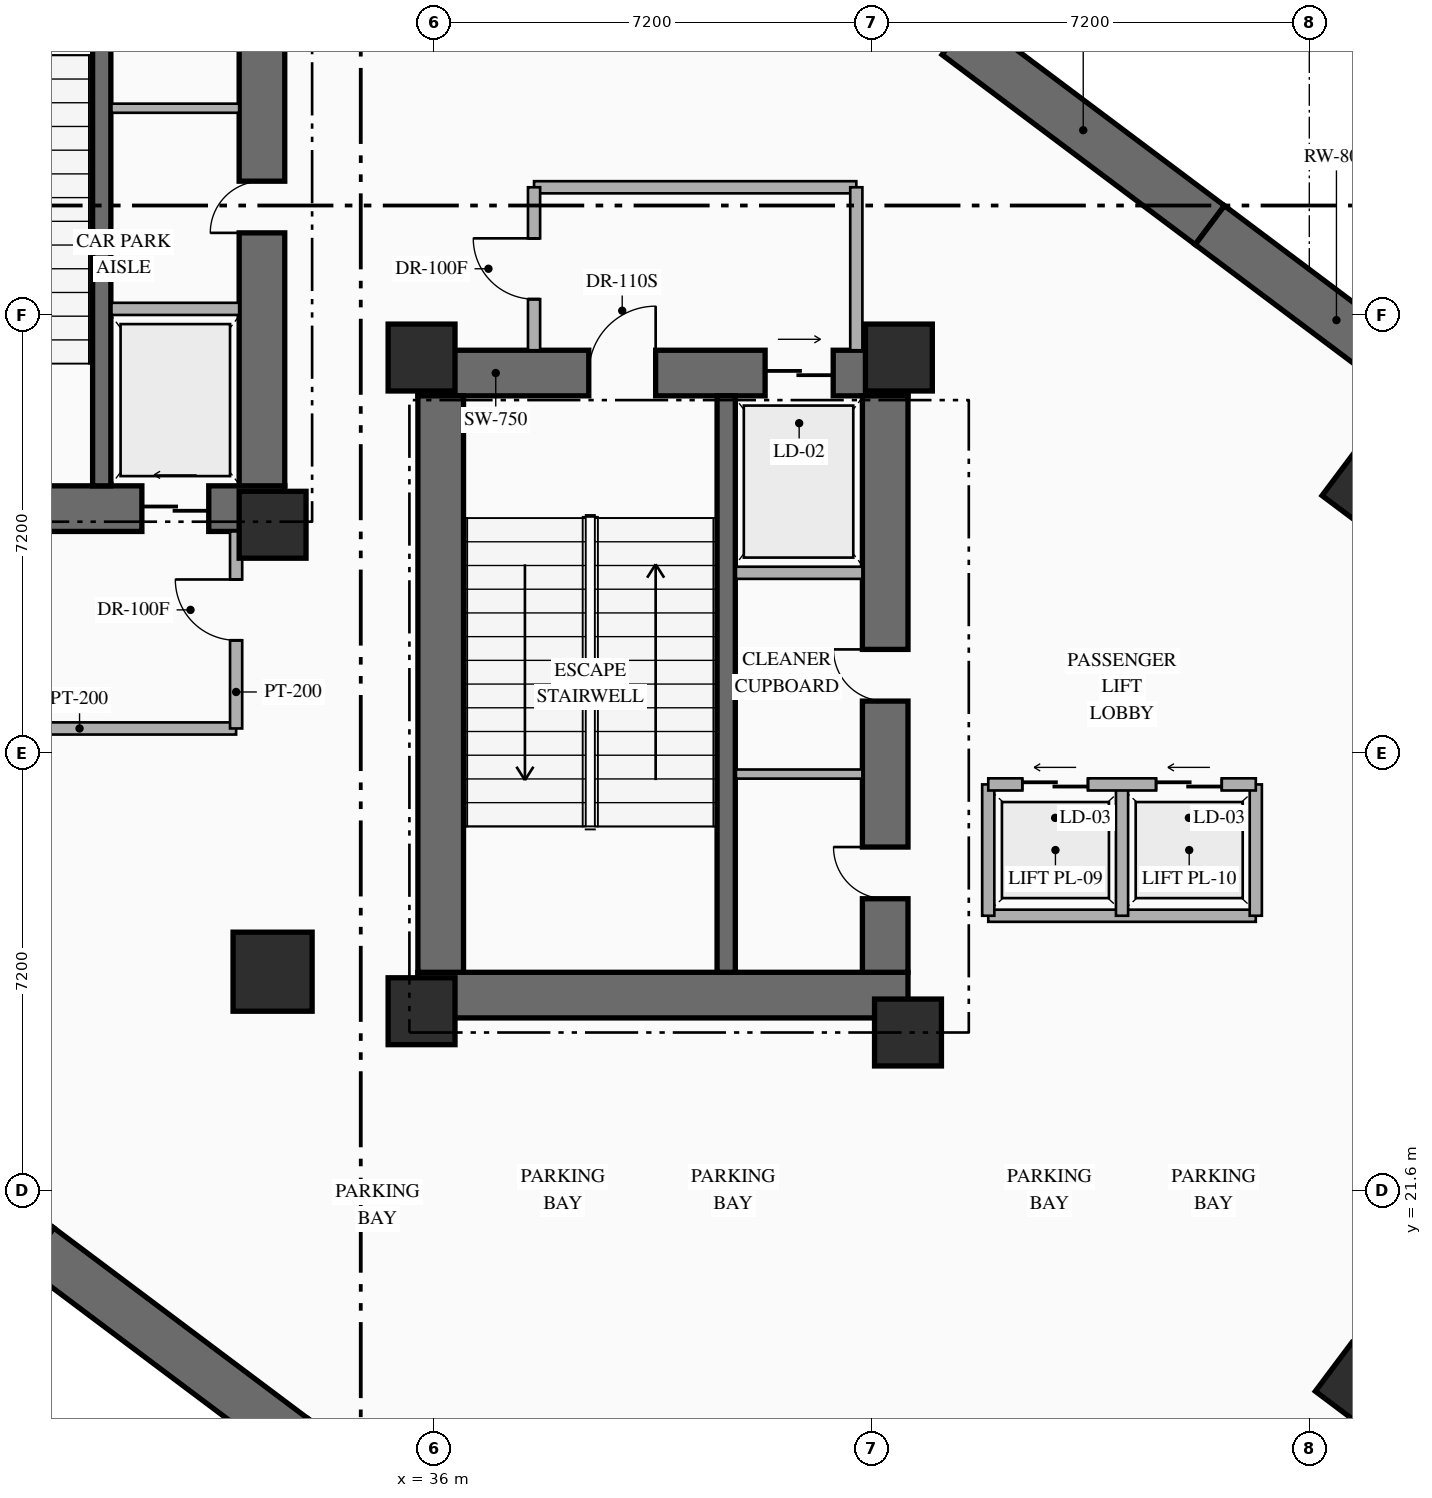
"""IFC4 building model, lengths in metres.
Left out: names, types, materials, properties, quantities, classifications, styles, units other than length and angle.
Written with IfcOpenShell. Run it as: python <this file> out.ifc"""

import sys

from ifc_helpers import new_model, si_unit, direction, frame, frame_2d, origin, origin_2d, place, context, subcontext, project, spatial, rectangle, hollow_rectangle, extrude, element, fill, save


model = new_model("IFC4")
c1 = context("Model", 3, precision=1e-05, world=origin(), true_north=direction((0.0, 1.0)))
c2 = subcontext(c1, "Body", "Model", "MODEL_VIEW")
j1 = project(units=[si_unit("LENGTHUNIT", "METRE"), si_unit("PLANEANGLEUNIT", "RADIAN")], contexts=[c1])
p1 = place(None, origin())
s1 = spatial("IfcSite", under=j1, at=p1, CompositionType="ELEMENT")
p2 = place(p1, origin())
s2 = spatial("IfcBuilding", under=s1, at=p2, CompositionType="ELEMENT")
p3 = place(p2, frame((0.0, 0.0, -9.6)))
s3 = spatial("IfcBuildingStorey", under=s2, at=p3, CompositionType="ELEMENT", Elevation=-9.6)
p4 = place(p3, frame((25.47, 32.815, 0.0), z_axis=(0.0, 0.0, 1.0), x_axis=(1.0, 0.0, 0.0)))
e1 = element("IfcWall", 1, at=p4, inside=s3, PredefinedType="SHEAR", context=c2, shape_type="SweptSolid", body=[
    extrude(rectangle(XDim=8.08, YDim=0.75, at=frame_2d((4.04, 0.0))), origin(), (0.0, 0.0, 1.0), 4.8),
])
p5 = place(p4, frame((2.98, 0.0, 0.0)))
e2 = element("IfcOpeningElement", 2, at=p5, cuts=e1, PredefinedType="OPENING", context=c2, shape_type="SweptSolid", body=[
    extrude(rectangle(XDim=1.1, YDim=2.2, at=frame_2d((0.55, 1.1))), frame((0.0, 0.385, 0.0), z_axis=(0.0, -1.0, 0.0), x_axis=(1.0, 0.0, 0.0)), (0.0, 0.0, 1.0), 0.77),
])
p6 = place(p4, frame((5.73, 0.0, 0.0)))
e3 = element("IfcOpeningElement", 3, at=p6, cuts=e1, PredefinedType="OPENING", context=c2, shape_type="SweptSolid", body=[
    extrude(rectangle(XDim=1.1, YDim=2.15, at=frame_2d((0.55, 1.075))), frame((0.0, 0.385, 0.0), z_axis=(0.0, -1.0, 0.0), x_axis=(1.0, 0.0, 0.0)), (0.0, 0.0, 1.0), 0.77),
])
p7 = place(p3, frame((33.175, 33.19, 0.0), z_axis=(0.0, 0.0, 1.0), x_axis=(0.0, 1.0, 0.0)))
e4 = element("IfcWall", 4, at=p7, inside=s3, PredefinedType="SHEAR", context=c2, shape_type="SweptSolid", body=[
    extrude(rectangle(XDim=9.48, YDim=0.75, at=frame_2d((4.74, 0.0))), origin(), (0.0, 0.0, 1.0), 4.8),
])
p8 = place(p7, frame((4.16, 0.0, 0.0)))
e5 = element("IfcOpeningElement", 5, at=p8, cuts=e4, PredefinedType="OPENING", context=c2, shape_type="SweptSolid", body=[
    extrude(rectangle(XDim=0.85, YDim=2.08, at=frame_2d((0.425, 1.04))), frame((0.0, 0.385, 0.0), z_axis=(0.0, -1.0, 0.0), x_axis=(1.0, 0.0, 0.0)), (0.0, 0.0, 1.0), 0.77),
])
p9 = place(p7, frame((7.36, 0.0, 0.0)))
e6 = element("IfcOpeningElement", 6, at=p9, cuts=e4, PredefinedType="OPENING", context=c2, shape_type="SweptSolid", body=[
    extrude(rectangle(XDim=0.85, YDim=2.08, at=frame_2d((0.425, 1.04))), frame((0.0, 0.385, 0.0), z_axis=(0.0, -1.0, 0.0), x_axis=(1.0, 0.0, 0.0)), (0.0, 0.0, 1.0), 0.77),
])
p10 = place(p3, frame((30.54, 33.19, 0.0), z_axis=(0.0, 0.0, 1.0), x_axis=(0.0, 1.0, 0.0)))
e7 = element("IfcWall", 7, at=p10, inside=s3, PredefinedType="SHEAR", context=c2, shape_type="SweptSolid", body=[
    extrude(rectangle(XDim=9.48, YDim=0.3, at=frame_2d((4.74, 0.0))), origin(), (0.0, 0.0, 1.0), 4.8),
])
p11 = place(p3, frame((35.74, 24.815, 0.0), z_axis=(0.0, 0.0, 1.0), x_axis=(1.0, 0.0, 0.0)))
e8 = element("IfcWall", 8, at=p11, inside=s3, PredefinedType="SHEAR", context=c2, shape_type="SweptSolid", body=[
    extrude(rectangle(XDim=8.06, YDim=0.75, at=frame_2d((4.03, 0.0))), origin(), (0.0, 0.0, 1.0), 4.8),
])
p12 = place(p3, frame((35.74, 35.045, 0.0), z_axis=(0.0, 0.0, 1.0), x_axis=(1.0, 0.0, 0.0)))
e9 = element("IfcWall", 9, at=p12, inside=s3, PredefinedType="SHEAR", context=c2, shape_type="SweptSolid", body=[
    extrude(rectangle(XDim=8.06, YDim=0.75, at=frame_2d((4.03, 0.0))), origin(), (0.0, 0.0, 1.0), 4.8),
])
p13 = place(p12, frame((2.81, 0.0, 0.0)))
e10 = element("IfcOpeningElement", 10, at=p13, cuts=e9, PredefinedType="OPENING", context=c2, shape_type="SweptSolid", body=[
    extrude(rectangle(XDim=1.1, YDim=2.2, at=frame_2d((0.55, 1.1))), frame((0.0, 0.385, 0.0), z_axis=(0.0, -1.0, 0.0), x_axis=(1.0, 0.0, 0.0)), (0.0, 0.0, 1.0), 0.77),
])
p14 = place(p12, frame((5.71, 0.0, 0.0)))
e11 = element("IfcOpeningElement", 11, at=p14, cuts=e9, PredefinedType="OPENING", context=c2, shape_type="SweptSolid", body=[
    extrude(rectangle(XDim=1.12, YDim=2.15, at=frame_2d((0.56, 1.075))), frame((0.0, 0.385, 0.0), z_axis=(0.0, -1.0, 0.0), x_axis=(1.0, 0.0, 0.0)), (0.0, 0.0, 1.0), 0.77),
])
p15 = place(p3, frame((36.115, 25.19, 0.0), z_axis=(0.0, 0.0, 1.0), x_axis=(0.0, 1.0, 0.0)))
e12 = element("IfcWall", 12, at=p15, inside=s3, PredefinedType="SHEAR", context=c2, shape_type="SweptSolid", body=[
    extrude(rectangle(XDim=9.48, YDim=0.75, at=frame_2d((4.74, 0.0))), origin(), (0.0, 0.0, 1.0), 4.8),
])
p16 = place(p3, frame((43.425, 25.19, 0.0), z_axis=(0.0, 0.0, 1.0), x_axis=(0.0, 1.0, 0.0)))
e13 = element("IfcWall", 13, at=p16, inside=s3, PredefinedType="SHEAR", context=c2, shape_type="SweptSolid", body=[
    extrude(rectangle(XDim=9.48, YDim=0.75, at=frame_2d((4.74, 0.0))), origin(), (0.0, 0.0, 1.0), 4.8),
])
p17 = place(p16, frame((1.21, 0.0, 0.0)))
e14 = element("IfcOpeningElement", 14, at=p17, cuts=e13, PredefinedType="OPENING", context=c2, shape_type="SweptSolid", body=[
    extrude(rectangle(XDim=0.85, YDim=2.08, at=frame_2d((0.425, 1.04))), frame((0.0, 0.385, 0.0), z_axis=(0.0, -1.0, 0.0), x_axis=(1.0, 0.0, 0.0)), (0.0, 0.0, 1.0), 0.77),
])
p18 = place(p16, frame((4.46, 0.0, 0.0)))
e15 = element("IfcOpeningElement", 15, at=p18, cuts=e13, PredefinedType="OPENING", context=c2, shape_type="SweptSolid", body=[
    extrude(rectangle(XDim=0.85, YDim=2.08, at=frame_2d((0.425, 1.04))), frame((0.0, 0.385, 0.0), z_axis=(0.0, -1.0, 0.0), x_axis=(1.0, 0.0, 0.0)), (0.0, 0.0, 1.0), 0.77),
])
p19 = place(p3, frame((40.81, 25.19, 0.0), z_axis=(0.0, 0.0, 1.0), x_axis=(0.0, 1.0, 0.0)))
e16 = element("IfcWall", 16, at=p19, inside=s3, PredefinedType="SHEAR", context=c2, shape_type="SweptSolid", body=[
    extrude(rectangle(XDim=9.48, YDim=0.3, at=frame_2d((4.74, 0.0))), origin(), (0.0, 0.0, 1.0), 4.8),
])
p20 = place(p3, frame((44.6, 40.6, 0.0), z_axis=(0.0, 0.0, 1.0), x_axis=(0.799983113496, -0.600022514679, 0.0)))
e17 = element("IfcWall", 17, at=p20, inside=s3, PredefinedType="SHEAR", context=c2, shape_type="SweptSolid", body=[
    extrude(rectangle(XDim=5.205, YDim=0.8, at=frame_2d((2.603, 0.0))), origin(), (0.0, 0.0, 1.0), 4.5),
])
p21 = place(p3, frame((48.764, 37.477, 0.0), z_axis=(0.0, 0.0, 1.0), x_axis=(0.799977491278, -0.600030010457, 0.0)))
e18 = element("IfcWall", 18, at=p21, inside=s3, PredefinedType="SHEAR", context=c2, shape_type="SweptSolid", body=[
    extrude(rectangle(XDim=5.207, YDim=0.8, at=frame_2d((2.603, 0.0))), origin(), (0.0, 0.0, 1.0), 4.5),
])
p22 = place(p3, frame((37.87, 14.397, 0.0), z_axis=(0.0, 0.0, 1.0), x_axis=(-0.800033648948, 0.599955132115, 0.0)))
e19 = element("IfcWall", 19, at=p22, inside=s3, PredefinedType="SHEAR", context=c2, shape_type="SweptSolid", body=[
    extrude(rectangle(XDim=5.224, YDim=0.8, at=frame_2d((2.612, 0.0))), origin(), (0.0, 0.0, 1.0), 4.5),
])
p23 = place(p3, frame((33.691, 17.531, 0.0), z_axis=(0.0, 0.0, 1.0), x_axis=(-0.799927090767, 0.600097200008, 0.0)))
e20 = element("IfcWall", 20, at=p23, inside=s3, PredefinedType="SHEAR", context=c2, shape_type="SweptSolid", body=[
    extrude(rectangle(XDim=5.224, YDim=0.8, at=frame_2d((2.612, 0.0))), origin(), (0.0, 0.0, 1.0), 4.5),
])
p24 = place(p3, frame((29.512, 20.666, 0.0), z_axis=(0.0, 0.0, 1.0), x_axis=(-0.800016825418, 0.599977565455, 0.0)))
e21 = element("IfcWall", 21, at=p24, inside=s3, PredefinedType="SHEAR", context=c2, shape_type="SweptSolid", body=[
    extrude(rectangle(XDim=5.224, YDim=0.8, at=frame_2d((2.612, 0.0))), origin(), (0.0, 0.0, 1.0), 4.5),
])
for number, where, z_axis, x_axis in (
    (22, (33.35, 32.55, 0.0), (0.0, 0.0, 1.0), (1.0, 0.0, 0.0)),
    (23, (35.8, 24.55, 0.0), (0.0, 0.0, 1.0), (1.0, 0.0, 0.0)),
    (24, (43.8, 24.2, 0.0), (0.0, 0.0, 1.0), (1.0, 0.0, 0.0)),
    (25, (35.8, 35.3, 0.0), (0.0, 0.0, 1.0), (1.0, 0.0, 0.0)),
    (26, (43.65, 35.3, 0.0), (0.0, 0.0, 1.0), (1.0, 0.0, 0.0)),
):
    element("IfcColumn", number, at=place(p3, frame(where, z_axis=z_axis, x_axis=x_axis)), inside=s3, PredefinedType="COLUMN", context=c2, shape_type="SweptSolid", body=[
        extrude(rectangle(XDim=1.1, YDim=1.1, at=origin_2d()), origin(), (0.0, 0.0, 1.0), 4.8),
    ])
for number, where, z_axis, x_axis in (
    (27, (33.35, 25.2, 0.0), (0.0, 0.0, 1.0), (1.0, 0.0, 0.0)),
    (28, (51.52, 33.16, 0.0), (0.0, 0.0, 1.0), (0.8, -0.6, 0.0)),
):
    element("IfcColumn", number, at=place(p3, frame(where, z_axis=z_axis, x_axis=x_axis)), inside=s3, PredefinedType="COLUMN", context=c2, shape_type="SweptSolid", body=[
        extrude(rectangle(XDim=1.3, YDim=1.3, at=origin_2d()), origin(), (0.0, 0.0, 1.0), 4.8),
    ])
p25 = place(p3, frame((51.2, 18.4, 0.0), z_axis=(0.0, 0.0, 1.0), x_axis=(0.799999996291, -0.600000004945, 0.0)))
e29 = element("IfcColumn", 29, at=p25, inside=s3, PredefinedType="COLUMN", context=c2, shape_type="SweptSolid", body=[
    extrude(hollow_rectangle(XDim=1.0, YDim=1.0, WallThickness=0.038, at=origin_2d()), origin(), (0.0, 0.0, 1.0), 4.8),
])
p26 = place(p3, frame((30.7, 36.1, 0.0), z_axis=(0.0, 0.0, 1.0), x_axis=(1.0, 0.0, 0.0)))
e30 = element("IfcWall", 30, at=p26, inside=s3, PredefinedType="STANDARD", context=c2, shape_type="SweptSolid", body=[
    extrude(rectangle(XDim=2.1, YDim=0.2, at=frame_2d((1.05, 0.0))), origin(), (0.0, 0.0, 1.0), 4.5),
])
p27 = place(p3, frame((30.7, 39.4, 0.0), z_axis=(0.0, 0.0, 1.0), x_axis=(1.0, 0.0, 0.0)))
e31 = element("IfcWall", 31, at=p27, inside=s3, PredefinedType="PARTITIONING", context=c2, shape_type="SweptSolid", body=[
    extrude(rectangle(XDim=2.1, YDim=0.15, at=frame_2d((1.05, 0.0))), origin(), (0.0, 0.0, 1.0), 4.5),
])
p28 = place(p3, frame((40.97, 31.76, 0.0), z_axis=(0.0, 0.0, 1.0), x_axis=(1.0, 0.0, 0.0)))
e32 = element("IfcWall", 32, at=p28, inside=s3, PredefinedType="STANDARD", context=c2, shape_type="SweptSolid", body=[
    extrude(rectangle(XDim=2.08, YDim=0.2, at=frame_2d((1.04, 0.0))), origin(), (0.0, 0.0, 1.0), 4.5),
])
p29 = place(p3, frame((40.97, 28.45, 0.0), z_axis=(0.0, 0.0, 1.0), x_axis=(1.0, 0.0, 0.0)))
e33 = element("IfcWall", 33, at=p29, inside=s3, PredefinedType="PARTITIONING", context=c2, shape_type="SweptSolid", body=[
    extrude(rectangle(XDim=2.08, YDim=0.15, at=frame_2d((1.04, 0.0))), origin(), (0.0, 0.0, 1.0), 4.5),
])
p30 = place(p3, frame((27.6, 29.2, 0.0), z_axis=(0.0, 0.0, 1.0), x_axis=(1.0, 0.0, 0.0)))
e34 = element("IfcWall", 34, at=p30, inside=s3, PredefinedType="STANDARD", context=c2, shape_type="SweptSolid", body=[
    extrude(rectangle(XDim=5.15, YDim=0.2, at=frame_2d((2.575, 0.0))), origin(), (0.0, 0.0, 1.0), 4.5),
])
p31 = place(p3, frame((32.75, 29.2, 0.0), z_axis=(0.0, 0.0, 1.0), x_axis=(0.0, 1.0, 0.0)))
e35 = element("IfcWall", 35, at=p31, inside=s3, PredefinedType="STANDARD", context=c2, shape_type="SweptSolid", body=[
    extrude(rectangle(XDim=3.24, YDim=0.2, at=frame_2d((1.62, 0.0))), origin(), (0.0, 0.0, 1.0), 4.5),
])
p32 = place(p31, frame((1.45, 0.0, 0.0)))
e36 = element("IfcOpeningElement", 36, at=p32, cuts=e35, PredefinedType="OPENING", context=c2, shape_type="SweptSolid", body=[
    extrude(rectangle(XDim=1.0, YDim=2.2, at=frame_2d((0.5, 1.1))), frame((0.0, 0.11, 0.0), z_axis=(0.0, -1.0, 0.0), x_axis=(1.0, 0.0, 0.0)), (0.0, 0.0, 1.0), 0.22),
])
p33 = place(p3, frame((37.65, 38.1, 0.0), z_axis=(0.0, 0.0, 1.0), x_axis=(1.0, 0.0, 0.0)))
e37 = element("IfcWall", 37, at=p33, inside=s3, PredefinedType="STANDARD", context=c2, shape_type="SweptSolid", body=[
    extrude(rectangle(XDim=5.3, YDim=0.2, at=frame_2d((2.65, 0.0))), origin(), (0.0, 0.0, 1.0), 4.5),
])
p34 = place(p3, frame((42.95, 35.42, 0.0), z_axis=(0.0, 0.0, 1.0), x_axis=(0.0, 1.0, 0.0)))
e38 = element("IfcWall", 38, at=p34, inside=s3, PredefinedType="STANDARD", context=c2, shape_type="SweptSolid", body=[
    extrude(rectangle(XDim=2.68, YDim=0.2, at=frame_2d((1.34, 0.0))), origin(), (0.0, 0.0, 1.0), 4.5),
])
p35 = place(p3, frame((37.65, 35.42, 0.0), z_axis=(0.0, 0.0, 1.0), x_axis=(0.0, 1.0, 0.0)))
e39 = element("IfcWall", 39, at=p35, inside=s3, PredefinedType="STANDARD", context=c2, shape_type="SweptSolid", body=[
    extrude(rectangle(XDim=2.68, YDim=0.2, at=frame_2d((1.34, 0.0))), origin(), (0.0, 0.0, 1.0), 4.5),
])
p36 = place(p35, frame((0.84, 0.0, 0.0)))
e40 = element("IfcOpeningElement", 40, at=p36, cuts=e39, PredefinedType="OPENING", context=c2, shape_type="SweptSolid", body=[
    extrude(rectangle(XDim=1.0, YDim=2.2, at=frame_2d((0.5, 1.1))), frame((0.0, 0.11, 0.0), z_axis=(0.0, -1.0, 0.0), x_axis=(1.0, 0.0, 0.0)), (0.0, 0.0, 1.0), 0.22),
])
p37 = place(p3, frame((45.12, 26.12, 0.0), z_axis=(0.0, 0.0, 1.0), x_axis=(1.0, 0.0, 0.0)))
e41 = element("IfcWall", 41, at=p37, inside=s3, PredefinedType="STANDARD", context=c2, shape_type="SweptSolid", body=[
    extrude(rectangle(XDim=4.4, YDim=0.2, at=frame_2d((2.2, 0.0))), origin(), (0.0, 0.0, 1.0), 4.5),
])
for number, where, z_axis, x_axis in (
    (42, (45.12, 26.12, 0.0), (0.0, 0.0, 1.0), (0.0, 1.0, 0.0)),
    (43, (49.52, 26.12, 0.0), (0.0, 0.0, 1.0), (0.0, 1.0, 0.0)),
    (44, (47.32, 26.12, 0.0), (0.0, 0.0, 1.0), (0.0, 1.0, 0.0)),
):
    element("IfcWall", number, at=place(p3, frame(where, z_axis=z_axis, x_axis=x_axis)), inside=s3, PredefinedType="STANDARD", context=c2, shape_type="SweptSolid", body=[
        extrude(rectangle(XDim=2.16, YDim=0.2, at=frame_2d((1.08, 0.0))), origin(), (0.0, 0.0, 1.0), 4.5),
    ])
p38 = place(p3, frame((45.12, 28.28, 0.0), z_axis=(0.0, 0.0, 1.0), x_axis=(1.0, 0.0, 0.0)))
e45 = element("IfcWall", 45, at=p38, inside=s3, PredefinedType="STANDARD", context=c2, shape_type="SweptSolid", body=[
    extrude(rectangle(XDim=4.4, YDim=0.2, at=frame_2d((2.2, 0.0))), origin(), (0.0, 0.0, 1.0), 4.5),
])
p39 = place(p38, frame((0.56, 0.0, 0.0)))
e46 = element("IfcOpeningElement", 46, at=p39, cuts=e45, PredefinedType="OPENING", context=c2, shape_type="SweptSolid", body=[
    extrude(rectangle(XDim=1.08, YDim=2.15, at=frame_2d((0.54, 1.075))), frame((0.0, 0.11, 0.0), z_axis=(0.0, -1.0, 0.0), x_axis=(1.0, 0.0, 0.0)), (0.0, 0.0, 1.0), 0.22),
])
p40 = place(p38, frame((2.76, 0.0, 0.0)))
e47 = element("IfcOpeningElement", 47, at=p40, cuts=e45, PredefinedType="OPENING", context=c2, shape_type="SweptSolid", body=[
    extrude(rectangle(XDim=1.08, YDim=2.15, at=frame_2d((0.54, 1.075))), frame((0.0, 0.11, 0.0), z_axis=(0.0, -1.0, 0.0), x_axis=(1.0, 0.0, 0.0)), (0.0, 0.0, 1.0), 0.22),
])
p41 = place(p6, origin())
e48 = element("IfcDoor", 48, at=p41, inside=s3, OperationType="SLIDING_TO_LEFT", PredefinedType="USERDEFINED", context=c2, shape_type="SweptSolid", body=[
    extrude(rectangle(XDim=1.1, YDim=2.15, at=frame_2d((0.55, 1.075))), frame((0.0, 0.025, 0.0), z_axis=(0.0, -1.0, 0.0), x_axis=(1.0, 0.0, 0.0)), (0.0, 0.0, 1.0), 0.05),
])
fill(e3, e48)
p42 = place(p13, origin())
e49 = element("IfcDoor", 49, at=p42, inside=s3, OperationType="SINGLE_SWING_RIGHT", PredefinedType="DOOR", context=c2, shape_type="SweptSolid", body=[
    extrude(rectangle(XDim=1.1, YDim=2.2, at=frame_2d((0.55, 1.1))), frame((0.0, 0.025, 0.0), z_axis=(0.0, -1.0, 0.0), x_axis=(1.0, 0.0, 0.0)), (0.0, 0.0, 1.0), 0.05),
])
fill(e10, e49)
p43 = place(p14, origin())
e50 = element("IfcDoor", 50, at=p43, inside=s3, OperationType="SLIDING_TO_RIGHT", PredefinedType="USERDEFINED", context=c2, shape_type="SweptSolid", body=[
    extrude(rectangle(XDim=1.12, YDim=2.15, at=frame_2d((0.56, 1.075))), frame((0.0, 0.025, 0.0), z_axis=(0.0, -1.0, 0.0), x_axis=(1.0, 0.0, 0.0)), (0.0, 0.0, 1.0), 0.05),
])
fill(e11, e50)
p44 = place(p8, origin())
e51 = element("IfcDoor", 51, at=p44, inside=s3, OperationType="SINGLE_SWING_LEFT", PredefinedType="DOOR", context=c2, shape_type="SweptSolid", body=[
    extrude(rectangle(XDim=0.85, YDim=2.08, at=frame_2d((0.425, 1.04))), frame((0.0, 0.025, 0.0), z_axis=(0.0, -1.0, 0.0), x_axis=(1.0, 0.0, 0.0)), (0.0, 0.0, 1.0), 0.05),
])
fill(e5, e51)
p45 = place(p17, origin())
e52 = element("IfcDoor", 52, at=p45, inside=s3, OperationType="SINGLE_SWING_RIGHT", PredefinedType="DOOR", context=c2, shape_type="SweptSolid", body=[
    extrude(rectangle(XDim=0.85, YDim=2.08, at=frame_2d((0.425, 1.04))), frame((0.0, 0.025, 0.0), z_axis=(0.0, -1.0, 0.0), x_axis=(1.0, 0.0, 0.0)), (0.0, 0.0, 1.0), 0.05),
])
fill(e14, e52)
p46 = place(p18, origin())
e53 = element("IfcDoor", 53, at=p46, inside=s3, OperationType="SINGLE_SWING_RIGHT", PredefinedType="DOOR", context=c2, shape_type="SweptSolid", body=[
    extrude(rectangle(XDim=0.85, YDim=2.08, at=frame_2d((0.425, 1.04))), frame((0.0, 0.025, 0.0), z_axis=(0.0, -1.0, 0.0), x_axis=(1.0, 0.0, 0.0)), (0.0, 0.0, 1.0), 0.05),
])
fill(e15, e53)
p47 = place(p32, origin())
e54 = element("IfcDoor", 54, at=p47, inside=s3, OperationType="SINGLE_SWING_RIGHT", PredefinedType="DOOR", context=c2, shape_type="SweptSolid", body=[
    extrude(rectangle(XDim=1.0, YDim=2.2, at=frame_2d((0.5, 1.1))), frame((0.0, 0.025, 0.0), z_axis=(0.0, -1.0, 0.0), x_axis=(1.0, 0.0, 0.0)), (0.0, 0.0, 1.0), 0.05),
])
fill(e36, e54)
p48 = place(p36, origin())
e55 = element("IfcDoor", 55, at=p48, inside=s3, OperationType="SINGLE_SWING_RIGHT", PredefinedType="DOOR", context=c2, shape_type="SweptSolid", body=[
    extrude(rectangle(XDim=1.0, YDim=2.2, at=frame_2d((0.5, 1.1))), frame((0.0, 0.025, 0.0), z_axis=(0.0, -1.0, 0.0), x_axis=(1.0, 0.0, 0.0)), (0.0, 0.0, 1.0), 0.05),
])
fill(e40, e55)
p49 = place(p39, origin())
e56 = element("IfcDoor", 56, at=p49, inside=s3, OperationType="SLIDING_TO_LEFT", PredefinedType="USERDEFINED", context=c2, shape_type="SweptSolid", body=[
    extrude(rectangle(XDim=1.08, YDim=2.15, at=frame_2d((0.54, 1.075))), frame((0.0, 0.025, 0.0), z_axis=(0.0, -1.0, 0.0), x_axis=(1.0, 0.0, 0.0)), (0.0, 0.0, 1.0), 0.05),
])
fill(e46, e56)
p50 = place(p40, origin())
e57 = element("IfcDoor", 57, at=p50, inside=s3, OperationType="SLIDING_TO_LEFT", PredefinedType="USERDEFINED", context=c2, shape_type="SweptSolid", body=[
    extrude(rectangle(XDim=1.08, YDim=2.15, at=frame_2d((0.54, 1.075))), frame((0.0, 0.025, 0.0), z_axis=(0.0, -1.0, 0.0), x_axis=(1.0, 0.0, 0.0)), (0.0, 0.0, 1.0), 0.05),
])
fill(e47, e57)
save(model, sys.argv[1])
